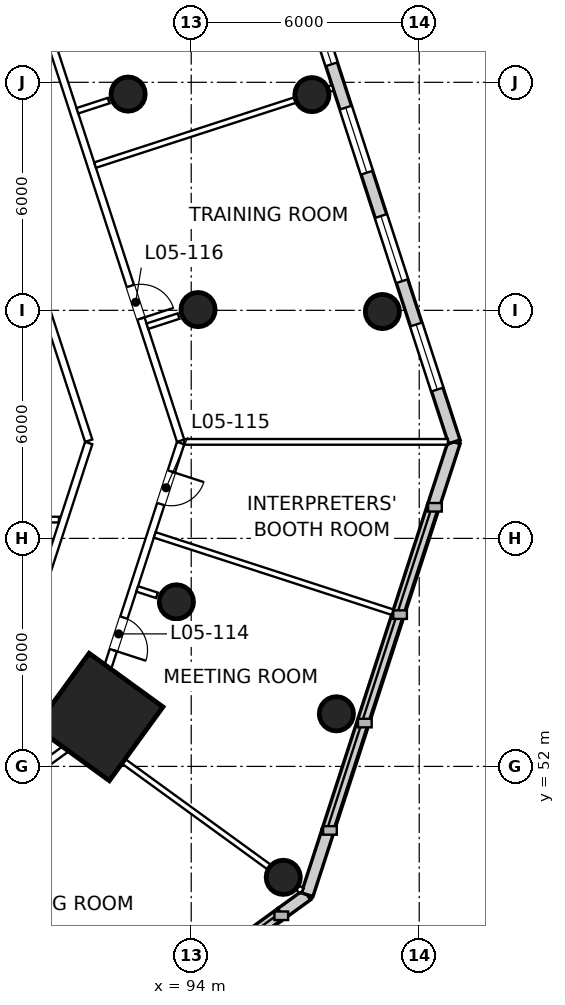
"""IFC4 building model, lengths in metres.
Left out: names, types, materials, properties, quantities, classifications, styles, units other than length and angle.
Written with IfcOpenShell. Run it as: python <this file> out.ifc"""

import sys

from ifc_helpers import new_model, si_unit, direction, frame, frame_2d, origin, origin_2d, place, context, subcontext, project, spatial, rectangle, circle, extrude, element, fill, save


model = new_model("IFC4")
c1 = context("Model", 3, precision=1e-05, world=origin(), true_north=direction((0.0, 1.0)))
c2 = subcontext(c1, "Body", "Model", "MODEL_VIEW")
j1 = project(units=[si_unit("LENGTHUNIT", "METRE"), si_unit("PLANEANGLEUNIT", "RADIAN")], contexts=[c1])
p1 = place(None, origin())
s1 = spatial("IfcSite", under=j1, at=p1, CompositionType="ELEMENT")
p2 = place(p1, origin())
s2 = spatial("IfcBuilding", under=s1, at=p2, CompositionType="ELEMENT")
p3 = place(p2, frame((0.0, 0.0, 34.0)))
s3 = spatial("IfcBuildingStorey", under=s2, at=p3, CompositionType="ELEMENT", Elevation=34.0)
p4 = place(p3, frame((91.58, 53.3, 0.0), z_axis=(0.0, 0.0, 1.0), x_axis=(0.809016994375, -0.587785252292, 0.0)))
e1 = element("IfcColumn", 1, at=p4, inside=s3, PredefinedType="COLUMN", context=c2, shape_type="SweptSolid", body=[
    extrude(rectangle(XDim=2.4, YDim=2.4, at=origin_2d()), origin(), (0.0, 0.0, 1.0), 5.0),
])
for number, where, z_axis, x_axis in (
    (2, (93.61, 56.33, 0.0), (0.0, 0.0, 1.0), (1.0, 0.0, 0.0)),
    (3, (94.18, 64.02, 0.0), (0.0, 0.0, 1.0), (1.0, 0.0, 0.0)),
    (4, (92.34, 69.69, 0.0), (0.0, 0.0, 1.0), (1.0, 0.0, 0.0)),
    (5, (96.422, 49.081, 0.0), (0.0, 0.0, 1.0), (1.0, 0.0, 0.0)),
    (6, (97.82, 53.384, 0.0), (0.0, 0.0, 1.0), (1.0, 0.0, 0.0)),
    (7, (99.03, 63.969, 0.0), (0.0, 0.0, 1.0), (1.0, 0.0, 0.0)),
    (8, (97.176, 69.676, 0.0), (0.0, 0.0, 1.0), (1.0, 0.0, 0.0)),
):
    element("IfcColumn", number, at=place(p3, frame(where, z_axis=z_axis, x_axis=x_axis)), inside=s3, PredefinedType="COLUMN", context=c2, shape_type="SweptSolid", body=[
        extrude(circle(Radius=0.45, at=origin_2d()), origin(), (0.0, 0.0, 1.0), 5.0),
    ])
p5 = place(p3, frame((89.085, 42.836, 0.0), z_axis=(0.0, 0.0, 1.0), x_axis=(0.808999938455, 0.587808727036, 0.0)))
e9 = element("IfcWall", 9, at=p5, inside=s3, PredefinedType="SOLIDWALL", context=c2, shape_type="SweptSolid", body=[
    extrude(rectangle(XDim=9.0, YDim=0.32, at=frame_2d((4.5, 0.0))), origin(), (0.0, 0.0, 1.0), 0.9),
])
p6 = place(p3, frame((96.366, 48.126, 0.0), z_axis=(0.0, 0.0, 1.0), x_axis=(0.809172006105, 0.587571837766, 0.0)))
e10 = element("IfcWall", 10, at=p6, inside=s3, PredefinedType="SOLIDWALL", context=c2, shape_type="SweptSolid", body=[
    extrude(rectangle(XDim=0.847, YDim=0.32, at=frame_2d((0.424, 0.0))), origin(), (0.0, 0.0, 1.0), 4.6),
])
p7 = place(p3, frame((97.052, 48.624, 0.0), z_axis=(0.0, 0.0, 1.0), x_axis=(0.308995332064, 0.951063554534, 0.0)))
e11 = element("IfcWall", 11, at=p7, inside=s3, PredefinedType="SOLIDWALL", context=c2, shape_type="SweptSolid", body=[
    extrude(rectangle(XDim=1.764, YDim=0.32, at=frame_2d((0.882, 0.0))), origin(), (0.0, 0.0, 1.0), 4.6),
])
p8 = place(p3, frame((97.597, 50.302, 0.0), z_axis=(0.0, 0.0, 1.0), x_axis=(0.309000197986, 0.951061973609, 0.0)))
e12 = element("IfcWall", 12, at=p8, inside=s3, PredefinedType="SOLIDWALL", context=c2, shape_type="SweptSolid", body=[
    extrude(rectangle(XDim=9.0, YDim=0.32, at=frame_2d((4.5, 0.0))), origin(), (0.0, 0.0, 1.0), 0.9),
])
p9 = place(p3, frame((100.378, 58.861, 0.0), z_axis=(0.0, 0.0, 1.0), x_axis=(0.309036002497, 0.951050339972, 0.0)))
e13 = element("IfcWall", 13, at=p9, inside=s3, PredefinedType="SOLIDWALL", context=c2, shape_type="SweptSolid", body=[
    extrude(rectangle(XDim=1.764, YDim=0.32, at=frame_2d((0.882, 0.0))), origin(), (0.0, 0.0, 1.0), 4.6),
])
p10 = place(p3, frame((100.923, 60.539, 0.0), z_axis=(0.0, 0.0, 1.0), x_axis=(-0.309015385889, 0.951057038922, 0.0)))
e14 = element("IfcWall", 14, at=p10, inside=s3, PredefinedType="SOLIDWALL", context=c2, shape_type="SweptSolid", body=[
    extrude(rectangle(XDim=25.694, YDim=0.32, at=frame_2d((12.847, 0.0))), origin(), (0.0, 0.0, 1.0), 4.6),
])
p11 = place(p10, frame((1.447, 0.0, 0.9)))
e15 = element("IfcOpeningElement", 15, at=p11, cuts=e14, PredefinedType="OPENING", context=c2, shape_type="SweptSolid", body=[
    extrude(rectangle(XDim=1.8, YDim=2.1, at=frame_2d((0.9, 1.05))), frame((0.0, 0.17, 0.0), z_axis=(0.0, -1.0, 0.0), x_axis=(1.0, 0.0, 0.0)), (0.0, 0.0, 1.0), 0.34),
])
p12 = place(p10, frame((4.447, 0.0, 0.9)))
e16 = element("IfcOpeningElement", 16, at=p12, cuts=e14, PredefinedType="OPENING", context=c2, shape_type="SweptSolid", body=[
    extrude(rectangle(XDim=1.8, YDim=2.1, at=frame_2d((0.9, 1.05))), frame((0.0, 0.17, 0.0), z_axis=(0.0, -1.0, 0.0), x_axis=(1.0, 0.0, 0.0)), (0.0, 0.0, 1.0), 0.34),
])
p13 = place(p10, frame((7.447, 0.0, 0.9)))
e17 = element("IfcOpeningElement", 17, at=p13, cuts=e14, PredefinedType="OPENING", context=c2, shape_type="SweptSolid", body=[
    extrude(rectangle(XDim=1.8, YDim=2.1, at=frame_2d((0.9, 1.05))), frame((0.0, 0.17, 0.0), z_axis=(0.0, -1.0, 0.0), x_axis=(1.0, 0.0, 0.0)), (0.0, 0.0, 1.0), 0.34),
])
p14 = place(p10, frame((10.447, 0.0, 0.9)))
e18 = element("IfcOpeningElement", 18, at=p14, cuts=e14, PredefinedType="OPENING", context=c2, shape_type="SweptSolid", body=[
    extrude(rectangle(XDim=1.8, YDim=2.1, at=frame_2d((0.9, 1.05))), frame((0.0, 0.17, 0.0), z_axis=(0.0, -1.0, 0.0), x_axis=(1.0, 0.0, 0.0)), (0.0, 0.0, 1.0), 0.34),
])
p15 = place(p10, frame((13.447, 0.0, 0.9)))
e19 = element("IfcOpeningElement", 19, at=p15, cuts=e14, PredefinedType="OPENING", context=c2, shape_type="SweptSolid", body=[
    extrude(rectangle(XDim=1.8, YDim=2.1, at=frame_2d((0.9, 1.05))), frame((0.0, 0.17, 0.0), z_axis=(0.0, -1.0, 0.0), x_axis=(1.0, 0.0, 0.0)), (0.0, 0.0, 1.0), 0.34),
])
p16 = place(p10, frame((16.447, 0.0, 0.9)))
e20 = element("IfcOpeningElement", 20, at=p16, cuts=e14, PredefinedType="OPENING", context=c2, shape_type="SweptSolid", body=[
    extrude(rectangle(XDim=1.8, YDim=2.1, at=frame_2d((0.9, 1.05))), frame((0.0, 0.17, 0.0), z_axis=(0.0, -1.0, 0.0), x_axis=(1.0, 0.0, 0.0)), (0.0, 0.0, 1.0), 0.34),
])
p17 = place(p10, frame((19.447, 0.0, 0.9)))
e21 = element("IfcOpeningElement", 21, at=p17, cuts=e14, PredefinedType="OPENING", context=c2, shape_type="SweptSolid", body=[
    extrude(rectangle(XDim=1.8, YDim=2.1, at=frame_2d((0.9, 1.05))), frame((0.0, 0.17, 0.0), z_axis=(0.0, -1.0, 0.0), x_axis=(1.0, 0.0, 0.0)), (0.0, 0.0, 1.0), 0.34),
])
p18 = place(p10, frame((22.447, 0.0, 0.9)))
e22 = element("IfcOpeningElement", 22, at=p18, cuts=e14, PredefinedType="OPENING", context=c2, shape_type="SweptSolid", body=[
    extrude(rectangle(XDim=1.8, YDim=2.1, at=frame_2d((0.9, 1.05))), frame((0.0, 0.17, 0.0), z_axis=(0.0, -1.0, 0.0), x_axis=(1.0, 0.0, 0.0)), (0.0, 0.0, 1.0), 0.34),
])
p19 = place(p3, frame((87.105, 80.931, 0.0), z_axis=(0.0, 0.0, 1.0), x_axis=(0.309020575415, -0.951055352737, 0.0)))
e23 = element("IfcWall", 23, at=p19, inside=s3, PredefinedType="PARTITIONING", context=c2, shape_type="SweptSolid", body=[
    extrude(rectangle(XDim=21.409, YDim=0.2, at=frame_2d((10.704, 0.0))), origin(), (0.0, 0.0, 1.0), 3.9),
])
p20 = place(p19, frame((17.129, 0.0, 0.0)))
e24 = element("IfcOpeningElement", 24, at=p20, cuts=e23, PredefinedType="OPENING", context=c2, shape_type="SweptSolid", body=[
    extrude(rectangle(XDim=0.9, YDim=2.1, at=frame_2d((0.45, 1.05))), frame((0.0, 0.11, 0.0), z_axis=(0.0, -1.0, 0.0), x_axis=(1.0, 0.0, 0.0)), (0.0, 0.0, 1.0), 0.22),
])
p21 = place(p19, frame((8.866, 0.0, 0.0)))
e25 = element("IfcOpeningElement", 25, at=p21, cuts=e23, PredefinedType="OPENING", context=c2, shape_type="SweptSolid", body=[
    extrude(rectangle(XDim=0.9, YDim=2.1, at=frame_2d((0.45, 1.05))), frame((0.0, 0.11, 0.0), z_axis=(0.0, -1.0, 0.0), x_axis=(1.0, 0.0, 0.0)), (0.0, 0.0, 1.0), 0.22),
])
p22 = place(p19, frame((2.054, 0.0, 0.0)))
e26 = element("IfcOpeningElement", 26, at=p22, cuts=e23, PredefinedType="OPENING", context=c2, shape_type="SweptSolid", body=[
    extrude(rectangle(XDim=0.9, YDim=2.1, at=frame_2d((0.45, 1.05))), frame((0.0, 0.11, 0.0), z_axis=(0.0, -1.0, 0.0), x_axis=(1.0, 0.0, 0.0)), (0.0, 0.0, 1.0), 0.22),
])
p23 = place(p3, frame((93.721, 60.508, 0.0), z_axis=(0.0, 0.0, 1.0), x_axis=(-0.309030308026, -0.951052190325, 0.0)))
e27 = element("IfcWall", 27, at=p23, inside=s3, PredefinedType="PARTITIONING", context=c2, shape_type="SweptSolid", body=[
    extrude(rectangle(XDim=8.019, YDim=0.2, at=frame_2d((4.009, 0.0))), origin(), (0.0, 0.0, 1.0), 4.1),
])
p24 = place(p23, frame((4.83, 0.0, 0.0)))
e28 = element("IfcOpeningElement", 28, at=p24, cuts=e27, PredefinedType="OPENING", context=c2, shape_type="SweptSolid", body=[
    extrude(rectangle(XDim=0.9, YDim=2.1, at=frame_2d((0.45, 1.05))), frame((0.0, 0.11, 0.0), z_axis=(0.0, -1.0, 0.0), x_axis=(1.0, 0.0, 0.0)), (0.0, 0.0, 1.0), 0.22),
])
p25 = place(p23, frame((0.788, 0.0, 0.0)))
e29 = element("IfcOpeningElement", 29, at=p25, cuts=e27, PredefinedType="OPENING", context=c2, shape_type="SweptSolid", body=[
    extrude(rectangle(XDim=0.9, YDim=2.1, at=frame_2d((0.45, 1.05))), frame((0.0, 0.11, 0.0), z_axis=(0.0, -1.0, 0.0), x_axis=(1.0, 0.0, 0.0)), (0.0, 0.0, 1.0), 0.22),
])
p26 = place(p3, frame((91.207, 52.832, 0.0), z_axis=(0.0, 0.0, 1.0), x_axis=(-0.809021104528, -0.58777959511, 0.0)))
e30 = element("IfcWall", 30, at=p26, inside=s3, PredefinedType="PARTITIONING", context=c2, shape_type="SweptSolid", body=[
    extrude(rectangle(XDim=7.998, YDim=0.2, at=frame_2d((3.999, 0.0))), origin(), (0.0, 0.0, 1.0), 4.1),
])
p27 = place(p26, frame((3.33, 0.0, 0.0)))
e31 = element("IfcOpeningElement", 31, at=p27, cuts=e30, PredefinedType="OPENING", context=c2, shape_type="SweptSolid", body=[
    extrude(rectangle(XDim=0.9, YDim=2.1, at=frame_2d((0.45, 1.05))), frame((0.0, 0.11, 0.0), z_axis=(0.0, -1.0, 0.0), x_axis=(1.0, 0.0, 0.0)), (0.0, 0.0, 1.0), 0.22),
])
p28 = place(p3, frame((89.287, 54.304, 0.0), z_axis=(0.0, 0.0, 1.0), x_axis=(0.308999759659, 0.951062116021, 0.0)))
e32 = element("IfcWall", 32, at=p28, inside=s3, PredefinedType="PARTITIONING", context=c2, shape_type="SweptSolid", body=[
    extrude(rectangle(XDim=6.524, YDim=0.2, at=frame_2d((3.262, 0.0))), origin(), (0.0, 0.0, 1.0), 4.6),
])
p29 = place(p3, frame((91.302, 60.57, 0.0), z_axis=(0.0, 0.0, 1.0), x_axis=(-0.309021827521, 0.951054945897, 0.0)))
e33 = element("IfcWall", 33, at=p29, inside=s3, PredefinedType="PARTITIONING", context=c2, shape_type="SweptSolid", body=[
    extrude(rectangle(XDim=18.99, YDim=0.2, at=frame_2d((9.495, 0.0))), origin(), (0.0, 0.0, 1.0), 4.6),
])
p30 = place(p3, frame((96.915, 48.723, 0.0), z_axis=(0.0, 0.0, 1.0), x_axis=(-0.809006827345, 0.587799245754, 0.0)))
e34 = element("IfcWall", 34, at=p30, inside=s3, PredefinedType="PARTITIONING", context=c2, shape_type="SweptSolid", body=[
    extrude(rectangle(XDim=6.939, YDim=0.15, at=frame_2d((3.469, 0.0))), origin(), (0.0, 0.0, 1.0), 4.6),
])
p31 = place(p3, frame((100.755, 60.539, 0.0), z_axis=(0.0, 0.0, 1.0), x_axis=(-1.0, 0.0, 0.0)))
e35 = element("IfcWall", 35, at=p31, inside=s3, PredefinedType="PARTITIONING", context=c2, shape_type="SweptSolid", body=[
    extrude(rectangle(XDim=6.939, YDim=0.15, at=frame_2d((3.469, 0.0))), origin(), (0.0, 0.0, 1.0), 3.9),
])
p32 = place(p3, frame((99.299, 56.058, 0.0), z_axis=(0.0, 0.0, 1.0), x_axis=(-0.951063784568, 0.308994624035, 0.0)))
e36 = element("IfcWall", 36, at=p32, inside=s3, PredefinedType="PARTITIONING", context=c2, shape_type="SweptSolid", body=[
    extrude(rectangle(XDim=6.58, YDim=0.15, at=frame_2d((3.29, 0.0))), origin(), (0.0, 0.0, 1.0), 3.9),
])
p33 = place(p3, frame((97.728, 69.855, 0.0), z_axis=(0.0, 0.0, 1.0), x_axis=(-0.951049337045, -0.309039088961, 0.0)))
e37 = element("IfcWall", 37, at=p33, inside=s3, PredefinedType="PARTITIONING", context=c2, shape_type="SweptSolid", body=[
    extrude(rectangle(XDim=6.58, YDim=0.15, at=frame_2d((3.29, 0.0))), origin(), (0.0, 0.0, 1.0), 4.1),
])
p34 = place(p3, frame((89.4, 58.494, 0.0), z_axis=(0.0, 0.0, 1.0), x_axis=(1.0, 0.0, 0.0)))
e38 = element("IfcWall", 38, at=p34, inside=s3, PredefinedType="PARTITIONING", context=c2, shape_type="SweptSolid", body=[
    extrude(rectangle(XDim=1.119, YDim=0.15, at=frame_2d((0.559, 0.0))), origin(), (0.0, 0.0, 1.0), 4.6),
])
p35 = place(p3, frame((93.098, 56.501, 0.0), z_axis=(0.0, 0.0, 1.0), x_axis=(-0.951027493825, 0.309106302085, 0.0)))
e39 = element("IfcWall", 39, at=p35, inside=s3, PredefinedType="PARTITIONING", context=c2, shape_type="SweptSolid", body=[
    extrude(rectangle(XDim=0.546, YDim=0.15, at=frame_2d((0.273, 0.0))), origin(), (0.0, 0.0, 1.0), 4.6),
])
p36 = place(p3, frame((93.668, 63.849, 0.0), z_axis=(0.0, 0.0, 1.0), x_axis=(-0.951061098376, -0.309002891826, 0.0)))
e40 = element("IfcWall", 40, at=p36, inside=s3, PredefinedType="PARTITIONING", context=c2, shape_type="SweptSolid", body=[
    extrude(rectangle(XDim=0.863, YDim=0.15, at=frame_2d((0.431, 0.0))), origin(), (0.0, 0.0, 1.0), 4.6),
])
p37 = place(p3, frame((91.828, 69.519, 0.0), z_axis=(0.0, 0.0, 1.0), x_axis=(-0.95113772004, -0.308766963123, 0.0)))
e41 = element("IfcWall", 41, at=p37, inside=s3, PredefinedType="PARTITIONING", context=c2, shape_type="SweptSolid", body=[
    extrude(rectangle(XDim=0.865, YDim=0.15, at=frame_2d((0.433, 0.0))), origin(), (0.0, 0.0, 1.0), 4.6),
])
p38 = place(p11, origin())
e42 = element("IfcWindow", 42, at=p38, inside=s3, PartitioningType="SINGLE_PANEL", PredefinedType="WINDOW", context=c2, shape_type="SweptSolid", body=[
    extrude(rectangle(XDim=1.8, YDim=2.1, at=frame_2d((0.9, 1.05))), frame((0.0, 0.07, 0.0), z_axis=(0.0, -1.0, 0.0), x_axis=(1.0, 0.0, 0.0)), (0.0, 0.0, 1.0), 0.06),
])
fill(e15, e42)
p39 = place(p12, origin())
e43 = element("IfcWindow", 43, at=p39, inside=s3, PartitioningType="SINGLE_PANEL", PredefinedType="WINDOW", context=c2, shape_type="SweptSolid", body=[
    extrude(rectangle(XDim=1.8, YDim=2.1, at=frame_2d((0.9, 1.05))), frame((0.0, 0.07, 0.0), z_axis=(0.0, -1.0, 0.0), x_axis=(1.0, 0.0, 0.0)), (0.0, 0.0, 1.0), 0.06),
])
fill(e16, e43)
p40 = place(p13, origin())
e44 = element("IfcWindow", 44, at=p40, inside=s3, PartitioningType="SINGLE_PANEL", PredefinedType="WINDOW", context=c2, shape_type="SweptSolid", body=[
    extrude(rectangle(XDim=1.8, YDim=2.1, at=frame_2d((0.9, 1.05))), frame((0.0, 0.07, 0.0), z_axis=(0.0, -1.0, 0.0), x_axis=(1.0, 0.0, 0.0)), (0.0, 0.0, 1.0), 0.06),
])
fill(e17, e44)
p41 = place(p14, origin())
e45 = element("IfcWindow", 45, at=p41, inside=s3, PartitioningType="SINGLE_PANEL", PredefinedType="WINDOW", context=c2, shape_type="SweptSolid", body=[
    extrude(rectangle(XDim=1.8, YDim=2.1, at=frame_2d((0.9, 1.05))), frame((0.0, 0.07, 0.0), z_axis=(0.0, -1.0, 0.0), x_axis=(1.0, 0.0, 0.0)), (0.0, 0.0, 1.0), 0.06),
])
fill(e18, e45)
p42 = place(p24, origin())
e46 = element("IfcDoor", 46, at=p42, inside=s3, OperationType="SINGLE_SWING_RIGHT", PredefinedType="DOOR", context=c2, shape_type="SweptSolid", body=[
    extrude(rectangle(XDim=0.9, YDim=2.1, at=frame_2d((0.45, 1.05))), frame((0.0, 0.025, 0.0), z_axis=(0.0, -1.0, 0.0), x_axis=(1.0, 0.0, 0.0)), (0.0, 0.0, 1.0), 0.05),
])
fill(e28, e46)
p43 = place(p25, origin())
e47 = element("IfcDoor", 47, at=p43, inside=s3, OperationType="SINGLE_SWING_LEFT", PredefinedType="DOOR", context=c2, shape_type="SweptSolid", body=[
    extrude(rectangle(XDim=0.9, YDim=2.1, at=frame_2d((0.45, 1.05))), frame((0.0, 0.025, 0.0), z_axis=(0.0, -1.0, 0.0), x_axis=(1.0, 0.0, 0.0)), (0.0, 0.0, 1.0), 0.05),
])
fill(e29, e47)
p44 = place(p20, origin())
e48 = element("IfcDoor", 48, at=p44, inside=s3, OperationType="SINGLE_SWING_RIGHT", PredefinedType="DOOR", context=c2, shape_type="SweptSolid", body=[
    extrude(rectangle(XDim=0.9, YDim=2.1, at=frame_2d((0.45, 1.05))), frame((0.0, 0.025, 0.0), z_axis=(0.0, -1.0, 0.0), x_axis=(1.0, 0.0, 0.0)), (0.0, 0.0, 1.0), 0.05),
])
fill(e24, e48)
save(model, sys.argv[1])
